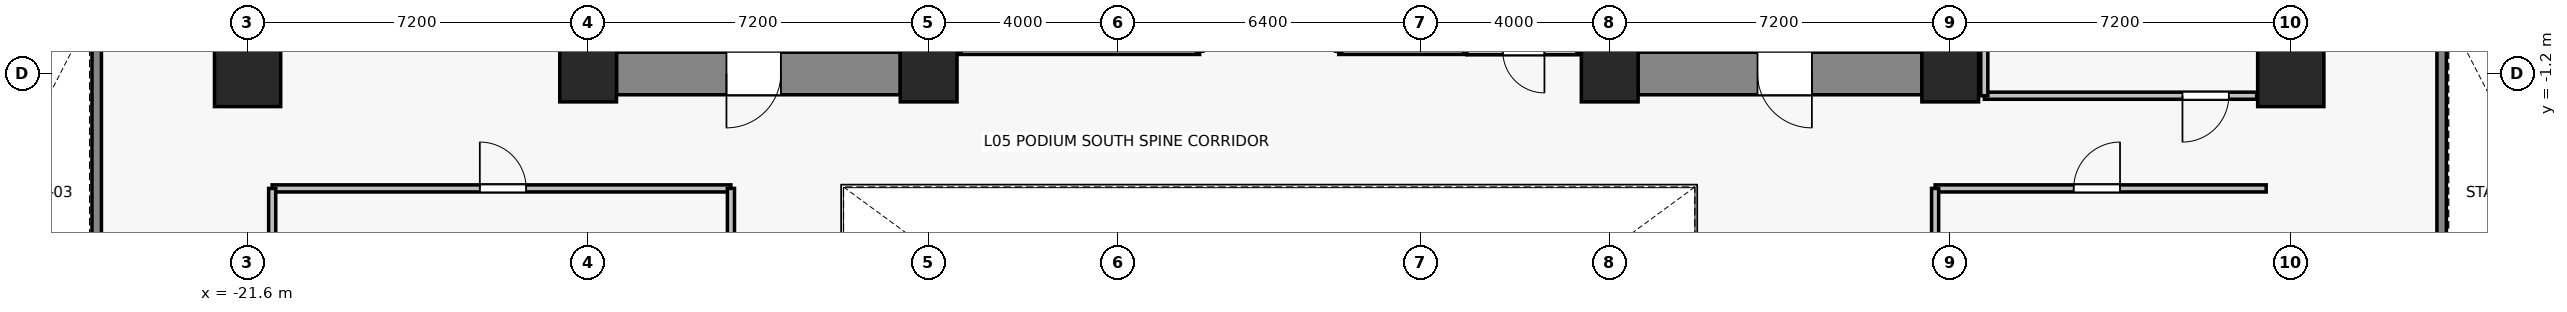
"""IFC4 building model, lengths in metres.
Left out: names, types, materials, properties, quantities, classifications, styles, units other than length and angle.
Written with IfcOpenShell. Run it as: python <this file> out.ifc"""

import sys

from ifc_helpers import new_model, si_unit, direction, frame, frame_2d, origin, origin_2d, place, context, subcontext, project, spatial, rectangle, extrude, source, transform, mapped, element, fill, save


model = new_model("IFC4")
c1 = context("Model", 3, precision=1e-05, world=origin(), true_north=direction((0.0, 1.0)))
c2 = subcontext(c1, "Body", "Model", "MODEL_VIEW")
j1 = project(units=[si_unit("LENGTHUNIT", "METRE"), si_unit("PLANEANGLEUNIT", "RADIAN")], contexts=[c1])
p1 = place(None, origin())
s1 = spatial("IfcSite", under=j1, at=p1, CompositionType="ELEMENT")
p2 = place(p1, origin())
s2 = spatial("IfcBuilding", under=s1, at=p2, CompositionType="ELEMENT")
p3 = place(p2, frame((0.0, 0.0, 22.6)))
s3 = spatial("IfcBuildingStorey", under=s2, at=p3, CompositionType="ELEMENT", Elevation=22.6)
for number, where, z_axis, x_axis in (
    (1, (-14.4, -1.2, 0.0), (0.0, 0.0, 1.0), (1.0, 0.0, 0.0)),
    (2, (-7.2, -1.2, 0.0), (0.0, 0.0, 1.0), (1.0, 0.0, 0.0)),
    (3, (7.2, -1.2, 0.0), (0.0, 0.0, 1.0), (1.0, 0.0, 0.0)),
    (4, (14.4, -1.2, 0.0), (0.0, 0.0, 1.0), (1.0, 0.0, 0.0)),
):
    element("IfcColumn", number, at=place(p3, frame(where, z_axis=z_axis, x_axis=x_axis)), inside=s3, PredefinedType="COLUMN", context=c2, shape_type="SweptSolid", body=[
        extrude(rectangle(XDim=1.2, YDim=1.2, at=origin_2d()), origin(), (0.0, 0.0, 1.0), 4.8),
    ])
for number, where, z_axis, x_axis in (
    (5, (-21.6, -1.2, 0.0), (0.0, 0.0, 1.0), (1.0, 0.0, 0.0)),
    (6, (21.6, -1.2, 0.0), (0.0, 0.0, 1.0), (1.0, 0.0, 0.0)),
):
    element("IfcColumn", number, at=place(p3, frame(where, z_axis=z_axis, x_axis=x_axis)), inside=s3, PredefinedType="COLUMN", context=c2, shape_type="SweptSolid", body=[
        extrude(rectangle(XDim=1.4, YDim=1.4, at=origin_2d()), origin(), (0.0, 0.0, 1.0), 4.8),
    ])
p4 = place(p3, frame((-7.8, -1.2, 0.0), z_axis=(0.0, 0.0, 1.0), x_axis=(-1.0, 0.0, 0.0)))
e7 = element("IfcWall", 7, at=p4, inside=s3, PredefinedType="SHEAR", context=c2, shape_type="SweptSolid", body=[
    extrude(rectangle(XDim=6.0, YDim=0.9, at=frame_2d((3.0, 0.0))), origin(), (0.0, 0.0, 1.0), 4.55),
])
p5 = place(p4, frame((2.525, 0.0, 0.0)))
e8 = element("IfcOpeningElement", 8, at=p5, cuts=e7, PredefinedType="OPENING", context=c2, shape_type="SweptSolid", body=[
    extrude(rectangle(XDim=1.15, YDim=2.15, at=frame_2d((0.575, 1.075))), frame((0.0, 0.46, 0.0), z_axis=(0.0, -1.0, 0.0), x_axis=(1.0, 0.0, 0.0)), (0.0, 0.0, 1.0), 0.92),
])
p6 = place(p3, frame((13.8, -1.2, 0.0), z_axis=(0.0, 0.0, 1.0), x_axis=(-1.0, 0.0, 0.0)))
e9 = element("IfcWall", 9, at=p6, inside=s3, PredefinedType="SHEAR", context=c2, shape_type="SweptSolid", body=[
    extrude(rectangle(XDim=6.0, YDim=0.9, at=frame_2d((3.0, 0.0))), origin(), (0.0, 0.0, 1.0), 4.55),
])
p7 = place(p6, frame((2.325, 0.0, 0.0)))
e10 = element("IfcOpeningElement", 10, at=p7, cuts=e9, PredefinedType="OPENING", context=c2, shape_type="SweptSolid", body=[
    extrude(rectangle(XDim=1.15, YDim=2.15, at=frame_2d((0.575, 1.075))), frame((0.0, 0.46, 0.0), z_axis=(0.0, -1.0, 0.0), x_axis=(1.0, 0.0, 0.0)), (0.0, 0.0, 1.0), 0.92),
])
p8 = place(p3, frame((-1.47, -0.73, 0.0), z_axis=(0.0, 0.0, 1.0), x_axis=(-1.0, 0.0, 0.0)))
e11 = element("IfcWall", 11, at=p8, inside=s3, PredefinedType="PARTITIONING", context=c2, shape_type="SweptSolid", body=[
    extrude(rectangle(XDim=5.11, YDim=0.135, at=frame_2d((2.555, 0.0))), origin(), (0.0, 0.0, 1.0), 4.55),
])
p9 = place(p3, frame((4.18, -0.73, 0.0), z_axis=(0.0, 0.0, 1.0), x_axis=(-1.0, 0.0, 0.0)))
e12 = element("IfcWall", 12, at=p9, inside=s3, PredefinedType="PARTITIONING", context=c2, shape_type="SweptSolid", body=[
    extrude(rectangle(XDim=2.71, YDim=0.135, at=frame_2d((1.355, 0.0))), origin(), (0.0, 0.0, 1.0), 4.55),
])
p10 = place(p3, frame((6.58, -0.73, 0.0), z_axis=(0.0, 0.0, 1.0), x_axis=(-1.0, 0.0, 0.0)))
e13 = element("IfcWall", 13, at=p10, inside=s3, PredefinedType="PARTITIONING", context=c2, shape_type="SweptSolid", body=[
    extrude(rectangle(XDim=2.4, YDim=0.15, at=frame_2d((1.2, 0.0))), origin(), (0.0, 0.0, 1.0), 4.55),
])
p11 = place(p10, frame((0.76, 0.0, 0.0)))
e14 = element("IfcOpeningElement", 14, at=p11, cuts=e13, PredefinedType="OPENING", context=c2, shape_type="SweptSolid", body=[
    extrude(rectangle(XDim=0.88, YDim=2.1, at=frame_2d((0.44, 1.05))), frame((0.0, 0.085, 0.0), z_axis=(0.0, -1.0, 0.0), x_axis=(1.0, 0.0, 0.0)), (0.0, 0.0, 1.0), 0.17),
])
for number, where, z_axis, x_axis in (
    (15, (-24.79, 0.16, 0.0), (0.0, 0.0, 1.0), (0.0, -1.0, 0.0)),
    (16, (24.79, -8.76, 0.0), (0.0, 0.0, 1.0), (0.0, 1.0, 0.0)),
):
    element("IfcWall", number, at=place(p3, frame(where, z_axis=z_axis, x_axis=x_axis)), inside=s3, PredefinedType="SOLIDWALL", context=c2, shape_type="SweptSolid", body=[
        extrude(rectangle(XDim=8.92, YDim=0.2, at=frame_2d((4.46, 0.0))), origin(), (0.0, 0.0, 1.0), 3.09),
    ])
p12 = place(p3, frame((-21.08, -3.63, 0.0), z_axis=(0.0, 0.0, 1.0), x_axis=(1.0, 0.0, 0.0)))
e17 = element("IfcWall", 17, at=p12, inside=s3, PredefinedType="PARTITIONING", context=c2, shape_type="SweptSolid", body=[
    extrude(rectangle(XDim=9.7, YDim=0.15, at=frame_2d((4.85, 0.0))), origin(), (0.0, 0.0, 1.0), 3.09),
])
p13 = place(p12, frame((4.39, 0.0, 0.0)))
e18 = element("IfcOpeningElement", 18, at=p13, cuts=e17, PredefinedType="OPENING", context=c2, shape_type="SweptSolid", body=[
    extrude(rectangle(XDim=0.98, YDim=2.15, at=frame_2d((0.49, 1.075))), frame((0.0, 0.085, 0.0), z_axis=(0.0, -1.0, 0.0), x_axis=(1.0, 0.0, 0.0)), (0.0, 0.0, 1.0), 0.17),
])
p14 = place(p3, frame((-21.08, -8.88, 0.0), z_axis=(0.0, 0.0, 1.0), x_axis=(0.0, 1.0, 0.0)))
e19 = element("IfcWall", 19, at=p14, inside=s3, PredefinedType="PARTITIONING", context=c2, shape_type="SweptSolid", body=[
    extrude(rectangle(XDim=5.25, YDim=0.15, at=frame_2d((2.625, 0.0))), origin(), (0.0, 0.0, 1.0), 4.04),
])
p15 = place(p3, frame((-11.38, -3.63, 0.0), z_axis=(0.0, 0.0, 1.0), x_axis=(0.0, -1.0, 0.0)))
e20 = element("IfcWall", 20, at=p15, inside=s3, PredefinedType="PARTITIONING", context=c2, shape_type="SweptSolid", body=[
    extrude(rectangle(XDim=8.09, YDim=0.15, at=frame_2d((4.045, 0.0))), origin(), (0.0, 0.0, 1.0), 3.19),
])
p16 = place(p3, frame((14.08, -3.63, 0.0), z_axis=(0.0, 0.0, 1.0), x_axis=(1.0, 0.0, 0.0)))
e21 = element("IfcWall", 21, at=p16, inside=s3, PredefinedType="PARTITIONING", context=c2, shape_type="SweptSolid", body=[
    extrude(rectangle(XDim=7.0, YDim=0.15, at=frame_2d((3.5, 0.0))), origin(), (0.0, 0.0, 1.0), 3.09),
])
p17 = place(p16, frame((2.93, 0.0, 0.0)))
e22 = element("IfcOpeningElement", 22, at=p17, cuts=e21, PredefinedType="OPENING", context=c2, shape_type="SweptSolid", body=[
    extrude(rectangle(XDim=0.98, YDim=2.15, at=frame_2d((0.49, 1.075))), frame((0.0, 0.085, 0.0), z_axis=(0.0, -1.0, 0.0), x_axis=(1.0, 0.0, 0.0)), (0.0, 0.0, 1.0), 0.17),
])
p18 = place(p3, frame((14.08, -17.48, 0.0), z_axis=(0.0, 0.0, 1.0), x_axis=(0.0, 1.0, 0.0)))
e23 = element("IfcWall", 23, at=p18, inside=s3, PredefinedType="PARTITIONING", context=c2, shape_type="SweptSolid", body=[
    extrude(rectangle(XDim=13.85, YDim=0.15, at=frame_2d((6.925, 0.0))), origin(), (0.0, 0.0, 1.0), 3.09),
])
p19 = place(p3, frame((20.88, -1.67, 0.0), z_axis=(0.0, 0.0, 1.0), x_axis=(-1.0, 0.0, 0.0)))
e24 = element("IfcWall", 24, at=p19, inside=s3, PredefinedType="PARTITIONING", context=c2, shape_type="SweptSolid", body=[
    extrude(rectangle(XDim=5.76, YDim=0.15, at=frame_2d((2.88, 0.0))), origin(), (0.0, 0.0, 1.0), 4.55),
])
p20 = place(p19, frame((0.59, 0.0, 0.0)))
e25 = element("IfcOpeningElement", 25, at=p20, cuts=e24, PredefinedType="OPENING", context=c2, shape_type="SweptSolid", body=[
    extrude(rectangle(XDim=0.98, YDim=2.15, at=frame_2d((0.49, 1.075))), frame((0.0, 0.085, 0.0), z_axis=(0.0, -1.0, 0.0), x_axis=(1.0, 0.0, 0.0)), (0.0, 0.0, 1.0), 0.17),
])
p21 = place(p3, frame((15.12, -1.67, 0.0), z_axis=(0.0, 0.0, 1.0), x_axis=(0.0, 1.0, 0.0)))
e26 = element("IfcWall", 26, at=p21, inside=s3, PredefinedType="PARTITIONING", context=c2, shape_type="SweptSolid", body=[
    extrude(rectangle(XDim=15.15, YDim=0.15, at=frame_2d((7.575, 0.0))), origin(), (0.0, 0.0, 1.0), 3.726),
])
m1 = source(origin(), c2, "Body", "SweptSolid", [
    extrude(rectangle(XDim=1.15, YDim=2.15, at=frame_2d((0.575, 1.075))), frame((0.0, 0.025, 0.0), z_axis=(0.0, -1.0, 0.0), x_axis=(1.0, 0.0, 0.0)), (0.0, 0.0, 1.0), 0.05),
])
p22 = place(p5, origin())
e27 = element("IfcDoor", 27, at=p22, inside=s3, OperationType="SINGLE_SWING_RIGHT", PredefinedType="DOOR", context=c2, shape_type="MappedRepresentation", body=[
    mapped(m1, transform((0.0, 0.0, 0.0), x_axis=(1.0, 0.0, 0.0), y_axis=(0.0, 1.0, 0.0), z_axis=(0.0, 0.0, 1.0), scale=1.0)),
])
fill(e8, e27)
p23 = place(p7, origin())
e28 = element("IfcDoor", 28, at=p23, inside=s3, OperationType="SINGLE_SWING_LEFT", PredefinedType="DOOR", context=c2, shape_type="MappedRepresentation", body=[
    mapped(m1, transform((0.0, 0.0, 0.0), x_axis=(1.0, 0.0, 0.0), y_axis=(0.0, 1.0, 0.0), z_axis=(0.0, 0.0, 1.0), scale=1.0)),
])
fill(e10, e28)
m2 = source(origin(), c2, "Body", "SweptSolid", [
    extrude(rectangle(XDim=0.88, YDim=2.1, at=frame_2d((0.44, 1.05))), frame((0.0, 0.025, 0.0), z_axis=(0.0, -1.0, 0.0), x_axis=(1.0, 0.0, 0.0)), (0.0, 0.0, 1.0), 0.05),
])
p24 = place(p11, origin())
e29 = element("IfcDoor", 29, at=p24, inside=s3, OperationType="SINGLE_SWING_LEFT", PredefinedType="DOOR", context=c2, shape_type="MappedRepresentation", body=[
    mapped(m2, transform((0.0, 0.0, 0.0), x_axis=(1.0, 0.0, 0.0), y_axis=(0.0, 1.0, 0.0), z_axis=(0.0, 0.0, 1.0), scale=1.0)),
])
fill(e14, e29)
m3 = source(origin(), c2, "Body", "SweptSolid", [
    extrude(rectangle(XDim=0.98, YDim=2.15, at=frame_2d((0.49, 1.075))), frame((0.0, 0.025, 0.0), z_axis=(0.0, -1.0, 0.0), x_axis=(1.0, 0.0, 0.0)), (0.0, 0.0, 1.0), 0.05),
])
p25 = place(p13, origin())
e30 = element("IfcDoor", 30, at=p25, inside=s3, OperationType="SINGLE_SWING_LEFT", PredefinedType="DOOR", context=c2, shape_type="MappedRepresentation", body=[
    mapped(m3, transform((0.0, 0.0, 0.0), x_axis=(1.0, 0.0, 0.0), y_axis=(0.0, 1.0, 0.0), z_axis=(0.0, 0.0, 1.0), scale=1.0)),
])
fill(e18, e30)
p26 = place(p17, origin())
e31 = element("IfcDoor", 31, at=p26, inside=s3, OperationType="SINGLE_SWING_RIGHT", PredefinedType="DOOR", context=c2, shape_type="MappedRepresentation", body=[
    mapped(m3, transform((0.0, 0.0, 0.0), x_axis=(1.0, 0.0, 0.0), y_axis=(0.0, 1.0, 0.0), z_axis=(0.0, 0.0, 1.0), scale=1.0)),
])
fill(e22, e31)
p27 = place(p20, origin())
e32 = element("IfcDoor", 32, at=p27, inside=s3, OperationType="SINGLE_SWING_RIGHT", PredefinedType="DOOR", context=c2, shape_type="MappedRepresentation", body=[
    mapped(m3, transform((0.0, 0.0, 0.0), x_axis=(1.0, 0.0, 0.0), y_axis=(0.0, 1.0, 0.0), z_axis=(0.0, 0.0, 1.0), scale=1.0)),
])
fill(e25, e32)
save(model, sys.argv[1])
